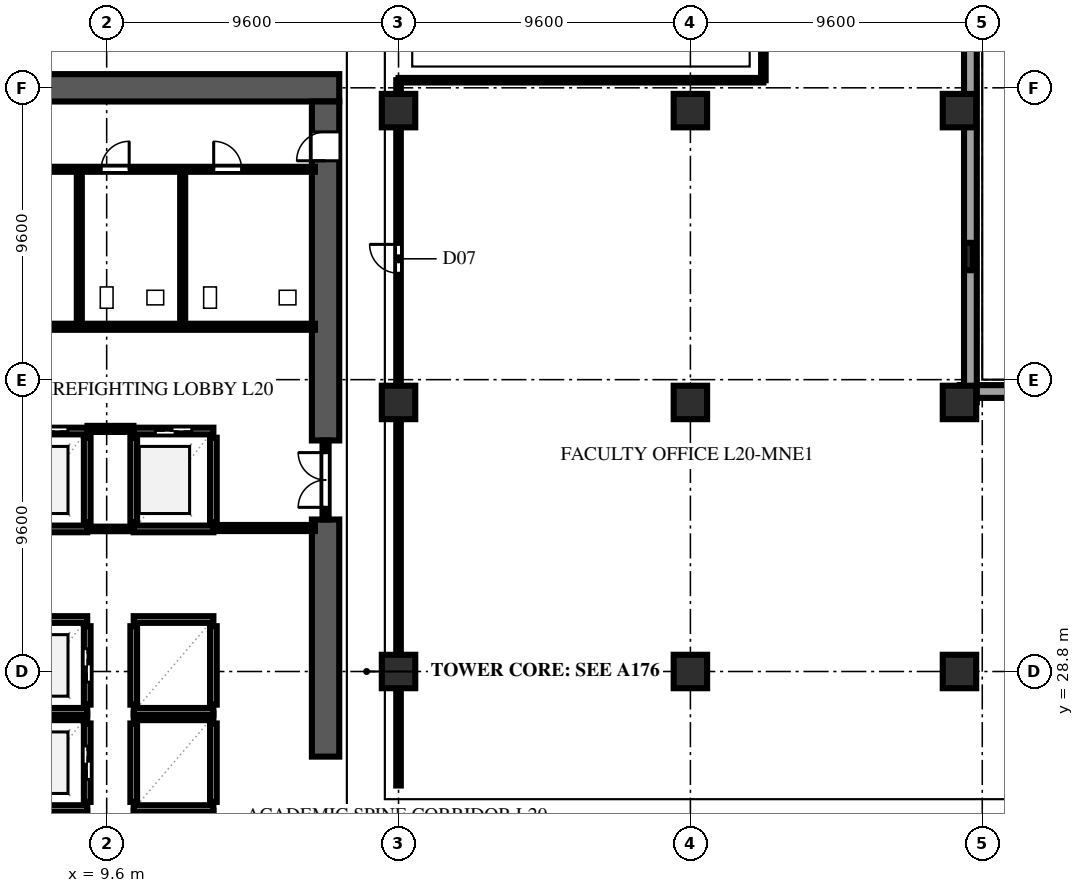
"""IFC4 building model, lengths in metres.
Left out: names, types, materials, properties, quantities, classifications, styles, units other than length and angle.
Written with IfcOpenShell. Run it as: python <this file> out.ifc"""

import sys

from ifc_helpers import new_model, si_unit, direction, frame, frame_2d, origin, origin_2d, place, context, subcontext, project, spatial, rectangle, extrude, element, fill, save


model = new_model("IFC4")
c1 = context("Model", 3, precision=1e-05, world=origin(), true_north=direction((0.0, 1.0)))
c2 = subcontext(c1, "Body", "Model", "MODEL_VIEW")
j1 = project(units=[si_unit("LENGTHUNIT", "METRE"), si_unit("PLANEANGLEUNIT", "RADIAN")], contexts=[c1])
p1 = place(None, origin())
s1 = spatial("IfcSite", under=j1, at=p1, CompositionType="ELEMENT")
p2 = place(p1, origin())
s2 = spatial("IfcBuilding", under=s1, at=p2, CompositionType="ELEMENT")
p3 = place(p2, frame((0.0, 0.0, 81.2)))
s3 = spatial("IfcBuildingStorey", under=s2, at=p3, CompositionType="ELEMENT", Elevation=81.2)
p4 = place(p3, frame((2.65, 48.0, 0.0), z_axis=(0.0, 0.0, 1.0), x_axis=(1.0, 0.0, 0.0)))
e1 = element("IfcWall", 1, at=p4, inside=s3, PredefinedType="SHEAR", context=c2, shape_type="SweptSolid", body=[
    extrude(rectangle(XDim=14.6, YDim=0.9, at=frame_2d((7.3, 0.0))), origin(), (0.0, 0.0, 1.0), 3.54),
])
p5 = place(p3, frame((16.8, 26.0, 0.0), z_axis=(0.0, 0.0, 1.0), x_axis=(0.0, 1.0, 0.0)))
e2 = element("IfcWall", 2, at=p5, inside=s3, PredefinedType="SHEAR", context=c2, shape_type="SweptSolid", body=[
    extrude(rectangle(XDim=7.8, YDim=0.9, at=frame_2d((3.9, 0.0))), origin(), (0.0, 0.0, 1.0), 3.54),
])
p6 = place(p3, frame((16.8, 36.4, 0.0), z_axis=(0.0, 0.0, 1.0), x_axis=(0.0, 1.0, 0.0)))
e3 = element("IfcWall", 3, at=p6, inside=s3, PredefinedType="SHEAR", context=c2, shape_type="SweptSolid", body=[
    extrude(rectangle(XDim=11.15, YDim=0.9, at=frame_2d((5.575, 0.0))), origin(), (0.0, 0.0, 1.0), 3.54),
])
p7 = place(p6, frame((9.2, 0.0, 0.0)))
e4 = element("IfcOpeningElement", 4, at=p7, cuts=e3, PredefinedType="OPENING", context=c2, shape_type="SweptSolid", body=[
    extrude(rectangle(XDim=0.95, YDim=2.15, at=frame_2d((0.475, 1.075))), frame((0.0, 0.462, 0.0), z_axis=(0.0, -1.0, 0.0), x_axis=(1.0, 0.0, 0.0)), (0.0, 0.0, 1.0), 0.924),
])
for number, where, z_axis, x_axis in (
    (5, (19.2, 28.8, 0.0), (0.0, 0.0, 1.0), (1.0, 0.0, 0.0)),
    (6, (19.2, 37.65, 0.0), (0.0, 0.0, 1.0), (1.0, 0.0, 0.0)),
    (7, (19.2, 47.25, 0.0), (0.0, 0.0, 1.0), (1.0, 0.0, 0.0)),
    (8, (28.8, 28.8, 0.0), (0.0, 0.0, 1.0), (1.0, 0.0, 0.0)),
    (9, (28.8, 37.65, 0.0), (0.0, 0.0, 1.0), (1.0, 0.0, 0.0)),
    (10, (28.8, 47.25, 0.0), (0.0, 0.0, 1.0), (1.0, 0.0, 0.0)),
    (11, (37.65, 28.8, 0.0), (0.0, 0.0, 1.0), (1.0, 0.0, 0.0)),
    (12, (37.65, 37.65, 0.0), (0.0, 0.0, 1.0), (1.0, 0.0, 0.0)),
    (13, (37.65, 47.25, 0.0), (0.0, 0.0, 1.0), (1.0, 0.0, 0.0)),
):
    element("IfcColumn", number, at=place(p3, frame(where, z_axis=z_axis, x_axis=x_axis)), inside=s3, PredefinedType="COLUMN", context=c2, shape_type="SweptSolid", body=[
        extrude(rectangle(XDim=1.1, YDim=1.1, at=origin_2d()), origin(), (0.0, 0.0, 1.0), 3.8),
    ])
p8 = place(p3, frame((37.95, 42.45, 0.0), z_axis=(0.0, 0.0, 1.0), x_axis=(0.0, 1.0, 0.0)))
e14 = element("IfcColumn", 14, at=p8, inside=s3, PredefinedType="PILASTER", context=c2, shape_type="SweptSolid", body=[
    extrude(rectangle(XDim=0.9, YDim=0.28, at=origin_2d()), origin(), (0.0, 0.0, 1.0), 3.8),
])
for number, where, z_axis, x_axis in (
    (15, (65.36, 38.01, 0.0), (0.0, 0.0, 1.0), (-1.0, 0.0, 0.0)),
    (16, (38.01, 37.66, 0.0), (0.0, 0.0, 1.0), (0.0, 1.0, 0.0)),
):
    element("IfcWall", number, at=place(p3, frame(where, z_axis=z_axis, x_axis=x_axis)), inside=s3, PredefinedType="SOLIDWALL", context=c2, shape_type="SweptSolid", body=[
        extrude(rectangle(XDim=27.7, YDim=0.42, at=frame_2d((13.85, 0.0))), origin(), (0.0, 0.0, 1.0), 3.54),
    ])
p9 = place(p3, frame((6.49, 24.11, 0.0), z_axis=(0.0, 0.0, 1.0), x_axis=(1.0, 0.0, 0.0)))
e17 = element("IfcWall", 17, at=p9, inside=s3, PredefinedType="SOLIDWALL", context=c2, shape_type="SweptSolid", body=[
    extrude(rectangle(XDim=2.47, YDim=0.22, at=frame_2d((1.235, 0.0))), origin(), (0.0, 0.0, 1.0), 3.54),
])
p10 = place(p3, frame((8.96, 24.51, 0.0), z_axis=(0.0, 0.0, 1.0), x_axis=(0.0, 1.0, 0.0)))
e18 = element("IfcWall", 18, at=p10, inside=s3, PredefinedType="SOLIDWALL", context=c2, shape_type="SweptSolid", body=[
    extrude(rectangle(XDim=2.58, YDim=0.22, at=frame_2d((1.29, 0.0))), origin(), (0.0, 0.0, 1.0), 3.54),
])
p11 = place(p10, frame((0.74, 0.0, 0.0)))
e19 = element("IfcOpeningElement", 19, at=p11, cuts=e18, PredefinedType="OPENING", context=c2, shape_type="SweptSolid", body=[
    extrude(rectangle(XDim=1.1, YDim=2.2, at=frame_2d((0.55, 1.1))), frame((0.0, 0.122, 0.0), z_axis=(0.0, -1.0, 0.0), x_axis=(1.0, 0.0, 0.0)), (0.0, 0.0, 1.0), 0.244),
])
for number, where, z_axis, x_axis in (
    (20, (6.49, 24.29, 0.0), (0.0, 0.0, 1.0), (1.0, 0.0, 0.0)),
    (21, (6.49, 27.31, 0.0), (0.0, 0.0, 1.0), (1.0, 0.0, 0.0)),
):
    element("IfcWall", number, at=place(p3, frame(where, z_axis=z_axis, x_axis=x_axis)), inside=s3, PredefinedType="SOLIDWALL", context=c2, shape_type="SweptSolid", body=[
        extrude(rectangle(XDim=2.47, YDim=0.22, at=frame_2d((1.235, 0.0))), origin(), (0.0, 0.0, 1.0), 3.54),
    ])
p12 = place(p3, frame((8.96, 27.71, 0.0), z_axis=(0.0, 0.0, 1.0), x_axis=(0.0, 1.0, 0.0)))
e22 = element("IfcWall", 22, at=p12, inside=s3, PredefinedType="SOLIDWALL", context=c2, shape_type="SweptSolid", body=[
    extrude(rectangle(XDim=2.58, YDim=0.22, at=frame_2d((1.29, 0.0))), origin(), (0.0, 0.0, 1.0), 3.54),
])
p13 = place(p12, frame((0.74, 0.0, 0.0)))
e23 = element("IfcOpeningElement", 23, at=p13, cuts=e22, PredefinedType="OPENING", context=c2, shape_type="SweptSolid", body=[
    extrude(rectangle(XDim=1.1, YDim=2.2, at=frame_2d((0.55, 1.1))), frame((0.0, 0.122, 0.0), z_axis=(0.0, -1.0, 0.0), x_axis=(1.0, 0.0, 0.0)), (0.0, 0.0, 1.0), 0.244),
])
for number, where, z_axis, x_axis in (
    (24, (6.49, 27.49, 0.0), (0.0, 0.0, 1.0), (1.0, 0.0, 0.0)),
    (25, (6.49, 30.51, 0.0), (0.0, 0.0, 1.0), (1.0, 0.0, 0.0)),
):
    element("IfcWall", number, at=place(p3, frame(where, z_axis=z_axis, x_axis=x_axis)), inside=s3, PredefinedType="SOLIDWALL", context=c2, shape_type="SweptSolid", body=[
        extrude(rectangle(XDim=2.47, YDim=0.22, at=frame_2d((1.235, 0.0))), origin(), (0.0, 0.0, 1.0), 3.54),
    ])
p14 = place(p3, frame((10.49, 24.11, 0.0), z_axis=(0.0, 0.0, 1.0), x_axis=(1.0, 0.0, 0.0)))
e26 = element("IfcWall", 26, at=p14, inside=s3, PredefinedType="SOLIDWALL", context=c2, shape_type="SweptSolid", body=[
    extrude(rectangle(XDim=2.62, YDim=0.22, at=frame_2d((1.31, 0.0))), origin(), (0.0, 0.0, 1.0), 3.54),
])
for number, where, z_axis, x_axis in (
    (27, (10.49, 24.51, 0.0), (0.0, 0.0, 1.0), (0.0, 1.0, 0.0)),
    (28, (13.11, 24.51, 0.0), (0.0, 0.0, 1.0), (0.0, 1.0, 0.0)),
):
    element("IfcWall", number, at=place(p3, frame(where, z_axis=z_axis, x_axis=x_axis)), inside=s3, PredefinedType="SOLIDWALL", context=c2, shape_type="SweptSolid", body=[
        extrude(rectangle(XDim=2.58, YDim=0.22, at=frame_2d((1.29, 0.0))), origin(), (0.0, 0.0, 1.0), 3.54),
    ])
for number, where, z_axis, x_axis in (
    (29, (10.49, 24.29, 0.0), (0.0, 0.0, 1.0), (1.0, 0.0, 0.0)),
    (30, (10.49, 27.31, 0.0), (0.0, 0.0, 1.0), (1.0, 0.0, 0.0)),
):
    element("IfcWall", number, at=place(p3, frame(where, z_axis=z_axis, x_axis=x_axis)), inside=s3, PredefinedType="SOLIDWALL", context=c2, shape_type="SweptSolid", body=[
        extrude(rectangle(XDim=2.62, YDim=0.22, at=frame_2d((1.31, 0.0))), origin(), (0.0, 0.0, 1.0), 3.54),
    ])
for number, where, z_axis, x_axis in (
    (31, (10.49, 27.71, 0.0), (0.0, 0.0, 1.0), (0.0, 1.0, 0.0)),
    (32, (13.11, 27.71, 0.0), (0.0, 0.0, 1.0), (0.0, 1.0, 0.0)),
):
    element("IfcWall", number, at=place(p3, frame(where, z_axis=z_axis, x_axis=x_axis)), inside=s3, PredefinedType="SOLIDWALL", context=c2, shape_type="SweptSolid", body=[
        extrude(rectangle(XDim=2.58, YDim=0.22, at=frame_2d((1.29, 0.0))), origin(), (0.0, 0.0, 1.0), 3.54),
    ])
for number, where, z_axis, x_axis in (
    (33, (10.49, 27.49, 0.0), (0.0, 0.0, 1.0), (1.0, 0.0, 0.0)),
    (34, (10.49, 30.51, 0.0), (0.0, 0.0, 1.0), (1.0, 0.0, 0.0)),
):
    element("IfcWall", number, at=place(p3, frame(where, z_axis=z_axis, x_axis=x_axis)), inside=s3, PredefinedType="SOLIDWALL", context=c2, shape_type="SweptSolid", body=[
        extrude(rectangle(XDim=2.62, YDim=0.22, at=frame_2d((1.31, 0.0))), origin(), (0.0, 0.0, 1.0), 3.54),
    ])
p15 = place(p3, frame((8.96, 33.71, 0.0), z_axis=(0.0, 0.0, 1.0), x_axis=(0.0, 1.0, 0.0)))
e35 = element("IfcWall", 35, at=p15, inside=s3, PredefinedType="SOLIDWALL", context=c2, shape_type="SweptSolid", body=[
    extrude(rectangle(XDim=2.78, YDim=0.22, at=frame_2d((1.39, 0.0))), origin(), (0.0, 0.0, 1.0), 3.54),
])
p16 = place(p3, frame((6.49, 33.49, 0.0), z_axis=(0.0, 0.0, 1.0), x_axis=(1.0, 0.0, 0.0)))
e36 = element("IfcWall", 36, at=p16, inside=s3, PredefinedType="SOLIDWALL", context=c2, shape_type="SweptSolid", body=[
    extrude(rectangle(XDim=2.47, YDim=0.22, at=frame_2d((1.235, 0.0))), origin(), (0.0, 0.0, 1.0), 3.54),
])
p17 = place(p3, frame((6.49, 36.71, 0.0), z_axis=(0.0, 0.0, 1.0), x_axis=(1.0, 0.0, 0.0)))
e37 = element("IfcWall", 37, at=p17, inside=s3, PredefinedType="SOLIDWALL", context=c2, shape_type="SweptSolid", body=[
    extrude(rectangle(XDim=2.47, YDim=0.22, at=frame_2d((1.235, 0.0))), origin(), (0.0, 0.0, 1.0), 3.54),
])
p18 = place(p17, frame((0.635, 0.0, 0.0)))
e38 = element("IfcOpeningElement", 38, at=p18, cuts=e37, PredefinedType="OPENING", context=c2, shape_type="SweptSolid", body=[
    extrude(rectangle(XDim=1.2, YDim=2.2, at=frame_2d((0.6, 1.1))), frame((0.0, 0.122, 0.0), z_axis=(0.0, -1.0, 0.0), x_axis=(1.0, 0.0, 0.0)), (0.0, 0.0, 1.0), 0.244),
])
for number, where, z_axis, x_axis in (
    (39, (10.49, 33.71, 0.0), (0.0, 0.0, 1.0), (0.0, 1.0, 0.0)),
    (40, (13.11, 33.71, 0.0), (0.0, 0.0, 1.0), (0.0, 1.0, 0.0)),
):
    element("IfcWall", number, at=place(p3, frame(where, z_axis=z_axis, x_axis=x_axis)), inside=s3, PredefinedType="SOLIDWALL", context=c2, shape_type="SweptSolid", body=[
        extrude(rectangle(XDim=2.78, YDim=0.22, at=frame_2d((1.39, 0.0))), origin(), (0.0, 0.0, 1.0), 3.54),
    ])
p19 = place(p3, frame((10.49, 33.49, 0.0), z_axis=(0.0, 0.0, 1.0), x_axis=(1.0, 0.0, 0.0)))
e41 = element("IfcWall", 41, at=p19, inside=s3, PredefinedType="SOLIDWALL", context=c2, shape_type="SweptSolid", body=[
    extrude(rectangle(XDim=2.62, YDim=0.22, at=frame_2d((1.31, 0.0))), origin(), (0.0, 0.0, 1.0), 3.54),
])
p20 = place(p3, frame((10.49, 36.71, 0.0), z_axis=(0.0, 0.0, 1.0), x_axis=(1.0, 0.0, 0.0)))
e42 = element("IfcWall", 42, at=p20, inside=s3, PredefinedType="SOLIDWALL", context=c2, shape_type="SweptSolid", body=[
    extrude(rectangle(XDim=2.62, YDim=0.22, at=frame_2d((1.31, 0.0))), origin(), (0.0, 0.0, 1.0), 3.54),
])
p21 = place(p20, frame((0.71, 0.0, 0.0)))
e43 = element("IfcOpeningElement", 43, at=p21, cuts=e42, PredefinedType="OPENING", context=c2, shape_type="SweptSolid", body=[
    extrude(rectangle(XDim=1.2, YDim=2.2, at=frame_2d((0.6, 1.1))), frame((0.0, 0.122, 0.0), z_axis=(0.0, -1.0, 0.0), x_axis=(1.0, 0.0, 0.0)), (0.0, 0.0, 1.0), 0.244),
])
p22 = place(p3, frame((8.97, 36.78, 0.0), z_axis=(0.0, 0.0, 1.0), x_axis=(1.0, 0.0, 0.0)))
e44 = element("IfcWall", 44, at=p22, inside=s3, PredefinedType="SOLIDWALL", context=c2, shape_type="SweptSolid", body=[
    extrude(rectangle(XDim=1.51, YDim=0.2, at=frame_2d((0.755, 0.0))), origin(), (0.0, 0.0, 1.0), 3.54),
])
p23 = place(p3, frame((13.12, 33.52, 0.0), z_axis=(0.0, 0.0, 1.0), x_axis=(1.0, 0.0, 0.0)))
e45 = element("IfcWall", 45, at=p23, inside=s3, PredefinedType="SOLIDWALL", context=c2, shape_type="SweptSolid", body=[
    extrude(rectangle(XDim=3.33, YDim=0.2, at=frame_2d((1.665, 0.0))), origin(), (0.0, 0.0, 1.0), 3.54),
])
p24 = place(p3, frame((6.32, 40.14, 0.0), z_axis=(0.0, 0.0, 1.0), x_axis=(1.0, 0.0, 0.0)))
e46 = element("IfcWall", 46, at=p24, inside=s3, PredefinedType="SOLIDWALL", context=c2, shape_type="SweptSolid", body=[
    extrude(rectangle(XDim=10.13, YDim=0.2, at=frame_2d((5.065, 0.0))), origin(), (0.0, 0.0, 1.0), 3.54),
])
p25 = place(p3, frame((16.8, 33.8, 0.0), z_axis=(0.0, 0.0, 1.0), x_axis=(0.0, 1.0, 0.0)))
e47 = element("IfcWall", 47, at=p25, inside=s3, PredefinedType="SOLIDWALL", context=c2, shape_type="SweptSolid", body=[
    extrude(rectangle(XDim=2.6, YDim=0.2, at=frame_2d((1.3, 0.0))), origin(), (0.0, 0.0, 1.0), 3.54),
])
p26 = place(p25, frame((0.4, 0.0, 0.0)))
e48 = element("IfcOpeningElement", 48, at=p26, cuts=e47, PredefinedType="OPENING", context=c2, shape_type="SweptSolid", body=[
    extrude(rectangle(XDim=1.8, YDim=2.2, at=frame_2d((0.9, 1.1))), frame((0.0, 0.112, 0.0), z_axis=(0.0, -1.0, 0.0), x_axis=(1.0, 0.0, 0.0)), (0.0, 0.0, 1.0), 0.224),
])
p27 = place(p3, frame((8.965, 33.49, 0.0), z_axis=(0.0, 0.0, 1.0), x_axis=(1.0, 0.0, 0.0)))
e49 = element("IfcWall", 49, at=p27, inside=s3, PredefinedType="PARTITIONING", context=c2, shape_type="SweptSolid", body=[
    extrude(rectangle(XDim=1.52, YDim=0.15, at=frame_2d((0.76, 0.0))), origin(), (0.0, 0.0, 1.0), 3.54),
])
p28 = place(p3, frame((6.32, 45.32, 0.0), z_axis=(0.0, 0.0, 1.0), x_axis=(1.0, 0.0, 0.0)))
e50 = element("IfcWall", 50, at=p28, inside=s3, PredefinedType="PLUMBINGWALL", context=c2, shape_type="SweptSolid", body=[
    extrude(rectangle(XDim=10.13, YDim=0.165, at=frame_2d((5.065, 0.0))), origin(), (0.0, 0.0, 1.0), 3.54),
])
p29 = place(p28, frame((0.55, 0.0, 0.0)))
e51 = element("IfcOpeningElement", 51, at=p29, cuts=e50, PredefinedType="OPENING", context=c2, shape_type="SweptSolid", body=[
    extrude(rectangle(XDim=0.85, YDim=2.1, at=frame_2d((0.425, 1.05))), frame((0.0, 0.094, 0.0), z_axis=(0.0, -1.0, 0.0), x_axis=(1.0, 0.0, 0.0)), (0.0, 0.0, 1.0), 0.189),
])
p30 = place(p28, frame((3.1, 0.0, 0.0)))
e52 = element("IfcOpeningElement", 52, at=p30, cuts=e50, PredefinedType="OPENING", context=c2, shape_type="SweptSolid", body=[
    extrude(rectangle(XDim=0.92, YDim=2.15, at=frame_2d((0.46, 1.075))), frame((0.0, 0.094, 0.0), z_axis=(0.0, -1.0, 0.0), x_axis=(1.0, 0.0, 0.0)), (0.0, 0.0, 1.0), 0.189),
])
p31 = place(p28, frame((6.8, 0.0, 0.0)))
e53 = element("IfcOpeningElement", 53, at=p31, cuts=e50, PredefinedType="OPENING", context=c2, shape_type="SweptSolid", body=[
    extrude(rectangle(XDim=0.92, YDim=2.15, at=frame_2d((0.46, 1.075))), frame((0.0, 0.094, 0.0), z_axis=(0.0, -1.0, 0.0), x_axis=(1.0, 0.0, 0.0)), (0.0, 0.0, 1.0), 0.189),
])
for number, where, z_axis, x_axis in (
    (54, (8.7, 40.4, 0.0), (0.0, 0.0, 1.0), (0.0, 1.0, 0.0)),
    (55, (12.1, 40.4, 0.0), (0.0, 0.0, 1.0), (0.0, 1.0, 0.0)),
):
    element("IfcWall", number, at=place(p3, frame(where, z_axis=z_axis, x_axis=x_axis)), inside=s3, PredefinedType="PLUMBINGWALL", context=c2, shape_type="SweptSolid", body=[
        extrude(rectangle(XDim=4.92, YDim=0.165, at=frame_2d((2.46, 0.0))), origin(), (0.0, 0.0, 1.0), 3.54),
    ])
p32 = place(p3, frame((19.2, 25.05, 0.0), z_axis=(0.0, 0.0, 1.0), x_axis=(0.0, 1.0, 0.0)))
e56 = element("IfcWall", 56, at=p32, inside=s3, PredefinedType="PARTITIONING", context=c2, shape_type="SweptSolid", body=[
    extrude(rectangle(XDim=23.2, YDim=0.15, at=frame_2d((11.6, 0.0))), origin(), (0.0, 0.0, 1.0), 3.071),
])
p33 = place(p32, frame((16.85, 0.0, 0.0)))
e57 = element("IfcOpeningElement", 57, at=p33, cuts=e56, PredefinedType="OPENING", context=c2, shape_type="SweptSolid", body=[
    extrude(rectangle(XDim=0.95, YDim=2.15, at=frame_2d((0.475, 1.075))), frame((0.0, 0.087, 0.0), z_axis=(0.0, -1.0, 0.0), x_axis=(1.0, 0.0, 0.0)), (0.0, 0.0, 1.0), 0.174),
])
p34 = place(p3, frame((19.2, 48.25, 0.0), z_axis=(0.0, 0.0, 1.0), x_axis=(1.0, 0.0, 0.0)))
e58 = element("IfcWall", 58, at=p34, inside=s3, PredefinedType="PARTITIONING", context=c2, shape_type="SweptSolid", body=[
    extrude(rectangle(XDim=12.0, YDim=0.15, at=frame_2d((6.0, 0.0))), origin(), (0.0, 0.0, 1.0), 3.54),
])
p35 = place(p3, frame((31.2, 48.25, 0.0), z_axis=(0.0, 0.0, 1.0), x_axis=(0.0, 1.0, 0.0)))
e59 = element("IfcWall", 59, at=p35, inside=s3, PredefinedType="PARTITIONING", context=c2, shape_type="SweptSolid", body=[
    extrude(rectangle(XDim=18.73, YDim=0.15, at=frame_2d((9.365, 0.0))), origin(), (0.0, 0.0, 1.0), 3.54),
])
p36 = place(p35, frame((3.4, 0.0, 0.0)))
e60 = element("IfcOpeningElement", 60, at=p36, cuts=e59, PredefinedType="OPENING", context=c2, shape_type="SweptSolid", body=[
    extrude(rectangle(XDim=1.0, YDim=2.2, at=frame_2d((0.5, 1.1))), frame((0.0, 0.087, 0.0), z_axis=(0.0, -1.0, 0.0), x_axis=(1.0, 0.0, 0.0)), (0.0, 0.0, 1.0), 0.174),
])
p37 = place(p11, origin())
e61 = element("IfcDoor", 61, at=p37, inside=s3, OperationType="DOUBLE_DOOR_SLIDING", PredefinedType="DOOR", context=c2, shape_type="SweptSolid", body=[
    extrude(rectangle(XDim=1.1, YDim=2.2, at=frame_2d((0.55, 1.1))), frame((0.0, 0.025, 0.0), z_axis=(0.0, -1.0, 0.0), x_axis=(1.0, 0.0, 0.0)), (0.0, 0.0, 1.0), 0.05),
])
fill(e19, e61)
p38 = place(p13, origin())
e62 = element("IfcDoor", 62, at=p38, inside=s3, OperationType="DOUBLE_DOOR_SLIDING", PredefinedType="DOOR", context=c2, shape_type="SweptSolid", body=[
    extrude(rectangle(XDim=1.1, YDim=2.2, at=frame_2d((0.55, 1.1))), frame((0.0, 0.025, 0.0), z_axis=(0.0, -1.0, 0.0), x_axis=(1.0, 0.0, 0.0)), (0.0, 0.0, 1.0), 0.05),
])
fill(e23, e62)
p39 = place(p18, origin())
e63 = element("IfcDoor", 63, at=p39, inside=s3, OperationType="DOUBLE_DOOR_SLIDING", PredefinedType="DOOR", context=c2, shape_type="SweptSolid", body=[
    extrude(rectangle(XDim=1.2, YDim=2.2, at=frame_2d((0.6, 1.1))), frame((0.0, 0.025, 0.0), z_axis=(0.0, -1.0, 0.0), x_axis=(1.0, 0.0, 0.0)), (0.0, 0.0, 1.0), 0.05),
])
fill(e38, e63)
p40 = place(p21, origin())
e64 = element("IfcDoor", 64, at=p40, inside=s3, OperationType="DOUBLE_DOOR_SLIDING", PredefinedType="DOOR", context=c2, shape_type="SweptSolid", body=[
    extrude(rectangle(XDim=1.2, YDim=2.2, at=frame_2d((0.6, 1.1))), frame((0.0, 0.025, 0.0), z_axis=(0.0, -1.0, 0.0), x_axis=(1.0, 0.0, 0.0)), (0.0, 0.0, 1.0), 0.05),
])
fill(e43, e64)
p41 = place(p7, origin())
e65 = element("IfcDoor", 65, at=p41, inside=s3, OperationType="SINGLE_SWING_LEFT", PredefinedType="DOOR", context=c2, shape_type="SweptSolid", body=[
    extrude(rectangle(XDim=0.95, YDim=2.15, at=frame_2d((0.475, 1.075))), frame((0.0, 0.025, 0.0), z_axis=(0.0, -1.0, 0.0), x_axis=(1.0, 0.0, 0.0)), (0.0, 0.0, 1.0), 0.05),
])
fill(e4, e65)
p42 = place(p26, origin())
e66 = element("IfcDoor", 66, at=p42, inside=s3, OperationType="DOUBLE_DOOR_SINGLE_SWING", PredefinedType="DOOR", context=c2, shape_type="SweptSolid", body=[
    extrude(rectangle(XDim=1.8, YDim=2.2, at=frame_2d((0.9, 1.1))), frame((0.0, 0.025, 0.0), z_axis=(0.0, -1.0, 0.0), x_axis=(1.0, 0.0, 0.0)), (0.0, 0.0, 1.0), 0.05),
])
fill(e48, e66)
p43 = place(p30, origin())
e67 = element("IfcDoor", 67, at=p43, inside=s3, OperationType="SINGLE_SWING_RIGHT", PredefinedType="DOOR", context=c2, shape_type="SweptSolid", body=[
    extrude(rectangle(XDim=0.92, YDim=2.15, at=frame_2d((0.46, 1.075))), frame((0.0, 0.025, 0.0), z_axis=(0.0, -1.0, 0.0), x_axis=(1.0, 0.0, 0.0)), (0.0, 0.0, 1.0), 0.05),
])
fill(e52, e67)
p44 = place(p31, origin())
e68 = element("IfcDoor", 68, at=p44, inside=s3, OperationType="SINGLE_SWING_LEFT", PredefinedType="DOOR", context=c2, shape_type="SweptSolid", body=[
    extrude(rectangle(XDim=0.92, YDim=2.15, at=frame_2d((0.46, 1.075))), frame((0.0, 0.025, 0.0), z_axis=(0.0, -1.0, 0.0), x_axis=(1.0, 0.0, 0.0)), (0.0, 0.0, 1.0), 0.05),
])
fill(e53, e68)
p45 = place(p33, origin())
e69 = element("IfcDoor", 69, at=p45, inside=s3, OperationType="SINGLE_SWING_RIGHT", PredefinedType="DOOR", context=c2, shape_type="SweptSolid", body=[
    extrude(rectangle(XDim=0.95, YDim=2.15, at=frame_2d((0.475, 1.075))), frame((0.0, 0.025, 0.0), z_axis=(0.0, -1.0, 0.0), x_axis=(1.0, 0.0, 0.0)), (0.0, 0.0, 1.0), 0.05),
])
fill(e57, e69)
save(model, sys.argv[1])
